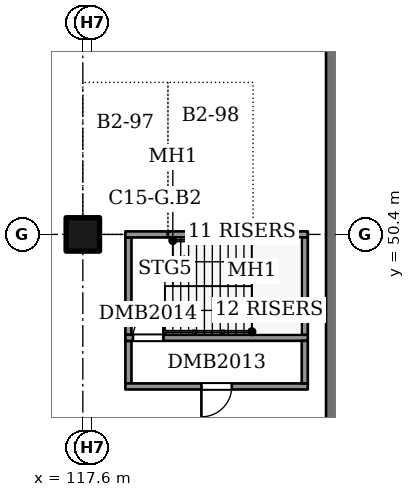
"""IFC4 building model, lengths in metres.
Left out: names, types, materials, properties, quantities, classifications, styles, units other than length and angle.
Written with IfcOpenShell. Run it as: python <this file> out.ifc"""

import sys

from ifc_helpers import new_model, si_unit, direction, frame, frame_2d, origin, origin_2d, place, context, subcontext, project, spatial, rectangle, extrude, element, fill, save


model = new_model("IFC4")
c1 = context("Model", 3, precision=1e-05, world=origin(), true_north=direction((0.0, 1.0)))
c2 = subcontext(c1, "Body", "Model", "MODEL_VIEW")
j1 = project(units=[si_unit("LENGTHUNIT", "METRE"), si_unit("PLANEANGLEUNIT", "RADIAN")], contexts=[c1])
p1 = place(None, origin())
s1 = spatial("IfcSite", under=j1, at=p1, CompositionType="ELEMENT")
p2 = place(p1, origin())
s2 = spatial("IfcBuilding", under=s1, at=p2, CompositionType="ELEMENT")
p3 = place(p2, frame((0.0, 0.0, -8.0)))
s3 = spatial("IfcBuildingStorey", under=s2, at=p3, CompositionType="ELEMENT", Elevation=-8.0)
p4 = place(p3, frame((126.0, 37.4, 0.0), z_axis=(0.0, 0.0, 1.0), x_axis=(0.0, 1.0, 0.0)))
e1 = element("IfcWall", 1, at=p4, inside=s3, PredefinedType="SOLIDWALL", context=c2, shape_type="SweptSolid", body=[
    extrude(rectangle(XDim=63.0, YDim=0.8, at=frame_2d((31.5, 0.0))), origin(), (0.0, 0.0, 1.0), 3.7),
])
p5 = place(p3, frame((117.6, 50.4, 0.0), z_axis=(0.0, 0.0, 1.0), x_axis=(1.0, 0.0, 0.0)))
e2 = element("IfcColumn", 2, at=p5, inside=s3, PredefinedType="COLUMN", context=c2, shape_type="SweptSolid", body=[
    extrude(rectangle(XDim=1.1, YDim=1.1, at=origin_2d()), origin(), (0.0, 0.0, 1.0), 3.7),
])
p6 = place(p3, frame((119.1, 45.5, 0.0), z_axis=(0.0, 0.0, 1.0), x_axis=(0.0, 1.0, 0.0)))
e3 = element("IfcWall", 3, at=p6, inside=s3, PredefinedType="SOLIDWALL", context=c2, shape_type="SweptSolid", body=[
    extrude(rectangle(XDim=1.4, YDim=0.2, at=frame_2d((0.7, 0.0))), origin(), (0.0, 0.0, 1.0), 3.7),
])
p7 = place(p3, frame((119.0, 45.4, 0.0), z_axis=(0.0, 0.0, 1.0), x_axis=(1.0, 0.0, 0.0)))
e4 = element("IfcWall", 4, at=p7, inside=s3, PredefinedType="SOLIDWALL", context=c2, shape_type="SweptSolid", body=[
    extrude(rectangle(XDim=6.0, YDim=0.2, at=frame_2d((3.0, 0.0))), origin(), (0.0, 0.0, 1.0), 3.7),
])
p8 = place(p7, frame((2.5, 0.0, 0.0)))
e5 = element("IfcOpeningElement", 5, at=p8, cuts=e4, PredefinedType="OPENING", context=c2, shape_type="SweptSolid", body=[
    extrude(rectangle(XDim=1.0, YDim=2.1, at=frame_2d((0.5, 1.05))), frame((0.0, 0.11, 0.0), z_axis=(0.0, -1.0, 0.0), x_axis=(1.0, 0.0, 0.0)), (0.0, 0.0, 1.0), 0.22),
])
p9 = place(p3, frame((119.1, 47.1, 0.0), z_axis=(0.0, 0.0, 1.0), x_axis=(0.0, 1.0, 0.0)))
e6 = element("IfcWall", 6, at=p9, inside=s3, PredefinedType="SOLIDWALL", context=c2, shape_type="SweptSolid", body=[
    extrude(rectangle(XDim=3.2, YDim=0.2, at=frame_2d((1.6, 0.0))), origin(), (0.0, 0.0, 1.0), 3.7),
])
p10 = place(p3, frame((119.0, 47.0, 0.0), z_axis=(0.0, 0.0, 1.0), x_axis=(1.0, 0.0, 0.0)))
e7 = element("IfcWall", 7, at=p10, inside=s3, PredefinedType="SOLIDWALL", context=c2, shape_type="SweptSolid", body=[
    extrude(rectangle(XDim=6.0, YDim=0.2, at=frame_2d((3.0, 0.0))), origin(), (0.0, 0.0, 1.0), 3.7),
])
p11 = place(p10, frame((0.25, 0.0, 0.0)))
e8 = element("IfcOpeningElement", 8, at=p11, cuts=e7, PredefinedType="OPENING", context=c2, shape_type="SweptSolid", body=[
    extrude(rectangle(XDim=1.0, YDim=2.1, at=frame_2d((0.5, 1.05))), frame((0.0, 0.11, 0.0), z_axis=(0.0, -1.0, 0.0), x_axis=(1.0, 0.0, 0.0)), (0.0, 0.0, 1.0), 0.22),
])
p12 = place(p3, frame((119.0, 50.4, 0.0), z_axis=(0.0, 0.0, 1.0), x_axis=(1.0, 0.0, 0.0)))
e9 = element("IfcWall", 9, at=p12, inside=s3, PredefinedType="SOLIDWALL", context=c2, shape_type="SweptSolid", body=[
    extrude(rectangle(XDim=1.4, YDim=0.2, at=frame_2d((0.7, 0.0))), origin(), (0.0, 0.0, 1.0), 3.7),
])
p13 = place(p3, frame((120.4, 50.4, 0.0), z_axis=(0.0, 0.0, 1.0), x_axis=(1.0, 0.0, 0.0)))
e10 = element("IfcWall", 10, at=p13, inside=s3, PredefinedType="SOLIDWALL", context=c2, shape_type="SweptSolid", body=[
    extrude(rectangle(XDim=2.8, YDim=0.2, at=frame_2d((1.4, 0.0))), origin(), (0.0, 0.0, 1.0), 3.7),
])
p14 = place(p3, frame((123.2, 50.4, 0.0), z_axis=(0.0, 0.0, 1.0), x_axis=(1.0, 0.0, 0.0)))
e11 = element("IfcWall", 11, at=p14, inside=s3, PredefinedType="SOLIDWALL", context=c2, shape_type="SweptSolid", body=[
    extrude(rectangle(XDim=1.8, YDim=0.2, at=frame_2d((0.9, 0.0))), origin(), (0.0, 0.0, 1.0), 3.7),
])
p15 = place(p3, frame((124.9, 45.5, 0.0), z_axis=(0.0, 0.0, 1.0), x_axis=(0.0, 1.0, 0.0)))
e12 = element("IfcWall", 12, at=p15, inside=s3, PredefinedType="SOLIDWALL", context=c2, shape_type="SweptSolid", body=[
    extrude(rectangle(XDim=1.4, YDim=0.2, at=frame_2d((0.7, 0.0))), origin(), (0.0, 0.0, 1.0), 3.7),
])
p16 = place(p3, frame((124.9, 47.1, 0.0), z_axis=(0.0, 0.0, 1.0), x_axis=(0.0, 1.0, 0.0)))
e13 = element("IfcWall", 13, at=p16, inside=s3, PredefinedType="SOLIDWALL", context=c2, shape_type="SweptSolid", body=[
    extrude(rectangle(XDim=3.2, YDim=0.2, at=frame_2d((1.6, 0.0))), origin(), (0.0, 0.0, 1.0), 3.7),
])
p17 = place(p8, frame((1.0, 0.0, 0.0), z_axis=(0.0, 0.0, 1.0), x_axis=(-1.0, 0.0, 0.0)))
e14 = element("IfcDoor", 14, at=p17, inside=s3, OperationType="SINGLE_SWING_RIGHT", PredefinedType="DOOR", context=c2, shape_type="SweptSolid", body=[
    extrude(rectangle(XDim=1.0, YDim=2.1, at=frame_2d((0.5, 1.05))), frame((0.0, 0.025, 0.0), z_axis=(0.0, -1.0, 0.0), x_axis=(1.0, 0.0, 0.0)), (0.0, 0.0, 1.0), 0.05),
])
fill(e5, e14)
p18 = place(p11, origin())
e15 = element("IfcDoor", 15, at=p18, inside=s3, OperationType="SINGLE_SWING_RIGHT", PredefinedType="DOOR", context=c2, shape_type="SweptSolid", body=[
    extrude(rectangle(XDim=1.0, YDim=2.1, at=frame_2d((0.5, 1.05))), frame((0.0, 0.025, 0.0), z_axis=(0.0, -1.0, 0.0), x_axis=(1.0, 0.0, 0.0)), (0.0, 0.0, 1.0), 0.05),
])
fill(e8, e15)
save(model, sys.argv[1])
